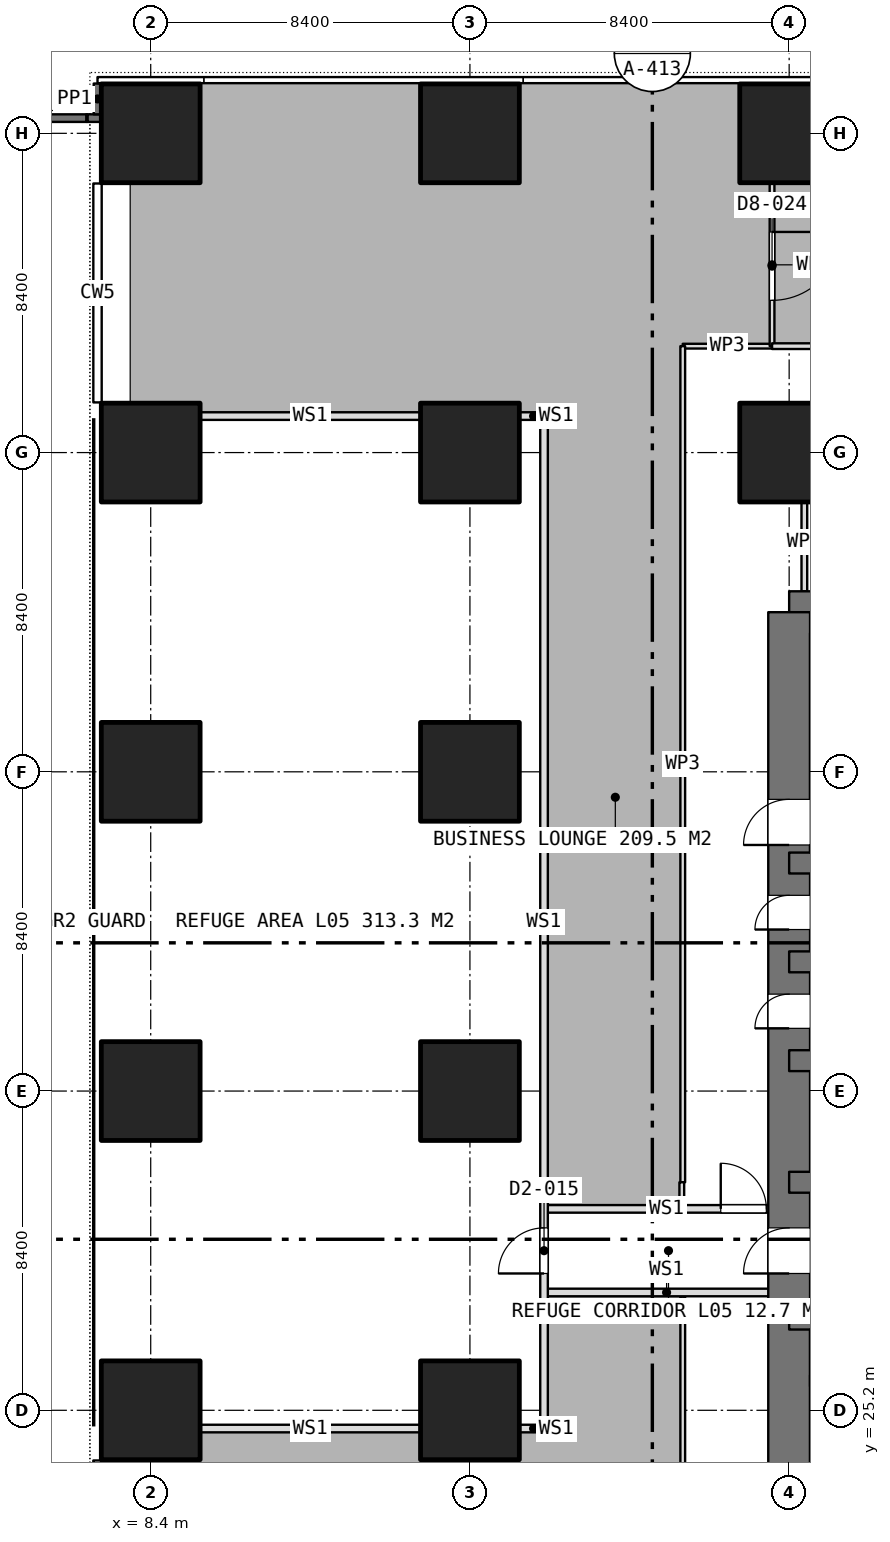
"""IFC4 building model, lengths in metres.
Left out: names, types, materials, properties, quantities, classifications, styles, units other than length and angle.
Written with IfcOpenShell. Run it as: python <this file> out.ifc"""

import sys

from ifc_helpers import new_model, si_unit, direction, frame, frame_2d, origin, origin_2d, place, context, subcontext, project, spatial, rectangle, extrude, element, fill, save


model = new_model("IFC4")
c1 = context("Model", 3, precision=1e-05, world=origin(), true_north=direction((0.0, 1.0)))
c2 = subcontext(c1, "Body", "Model", "MODEL_VIEW")
j1 = project(units=[si_unit("LENGTHUNIT", "METRE"), si_unit("PLANEANGLEUNIT", "RADIAN")], contexts=[c1])
p1 = place(None, origin())
s1 = spatial("IfcSite", under=j1, at=p1, CompositionType="ELEMENT")
p2 = place(p1, origin())
s2 = spatial("IfcBuilding", under=s1, at=p2, CompositionType="ELEMENT")
p3 = place(p2, frame((0.0, 0.0, 25.4)))
s3 = spatial("IfcBuildingStorey", under=s2, at=p3, CompositionType="ELEMENT", Elevation=25.4)
p4 = place(p3, frame((25.2, 46.2, 0.0), z_axis=(0.0, 0.0, 1.0), x_axis=(1.0, 0.0, 0.0)))
e1 = element("IfcWall", 1, at=p4, inside=s3, PredefinedType="SHEAR", context=c2, shape_type="SweptSolid", body=[
    extrude(rectangle(XDim=10.4, YDim=1.1, at=frame_2d((5.2, 0.0))), origin(), (0.0, 0.0, 1.0), 3.75),
])
p5 = place(p3, frame((25.2, 21.0, 0.0), z_axis=(0.0, 0.0, 1.0), x_axis=(0.0, 1.0, 0.0)))
e2 = element("IfcWall", 2, at=p5, inside=s3, PredefinedType="SHEAR", context=c2, shape_type="SweptSolid", body=[
    extrude(rectangle(XDim=25.2, YDim=1.1, at=frame_2d((12.6, 0.0))), origin(), (0.0, 0.0, 1.0), 3.75),
])
p6 = place(p5, frame((7.8, 0.0, 0.0)))
e3 = element("IfcOpeningElement", 3, at=p6, cuts=e2, PredefinedType="OPENING", context=c2, shape_type="SweptSolid", body=[
    extrude(rectangle(XDim=1.2, YDim=2.1, at=frame_2d((0.6, 1.05))), frame((0.0, 0.56, 0.0), z_axis=(0.0, -1.0, 0.0), x_axis=(1.0, 0.0, 0.0)), (0.0, 0.0, 1.0), 1.12),
])
p7 = place(p5, frame((14.25, 0.0, 0.0)))
e4 = element("IfcOpeningElement", 4, at=p7, cuts=e2, PredefinedType="OPENING", context=c2, shape_type="SweptSolid", body=[
    extrude(rectangle(XDim=0.9, YDim=2.1, at=frame_2d((0.45, 1.05))), frame((0.0, 0.56, 0.0), z_axis=(0.0, -1.0, 0.0), x_axis=(1.0, 0.0, 0.0)), (0.0, 0.0, 1.0), 1.12),
])
p8 = place(p5, frame((16.85, 0.0, 0.0)))
e5 = element("IfcOpeningElement", 5, at=p8, cuts=e2, PredefinedType="OPENING", context=c2, shape_type="SweptSolid", body=[
    extrude(rectangle(XDim=0.9, YDim=2.1, at=frame_2d((0.45, 1.05))), frame((0.0, 0.56, 0.0), z_axis=(0.0, -1.0, 0.0), x_axis=(1.0, 0.0, 0.0)), (0.0, 0.0, 1.0), 1.12),
])
p9 = place(p5, frame((19.075, 0.0, 0.0)))
e6 = element("IfcOpeningElement", 6, at=p9, cuts=e2, PredefinedType="OPENING", context=c2, shape_type="SweptSolid", body=[
    extrude(rectangle(XDim=1.2, YDim=2.1, at=frame_2d((0.6, 1.05))), frame((0.0, 0.56, 0.0), z_axis=(0.0, -1.0, 0.0), x_axis=(1.0, 0.0, 0.0)), (0.0, 0.0, 1.0), 1.12),
])
p10 = place(p3, frame((25.2, 27.6, 0.0), z_axis=(0.0, 0.0, 1.0), x_axis=(1.0, 0.0, 0.0)))
e7 = element("IfcWall", 7, at=p10, inside=s3, PredefinedType="SHEAR", context=c2, shape_type="SweptSolid", body=[
    extrude(rectangle(XDim=6.6, YDim=0.55, at=frame_2d((3.3, 0.0))), origin(), (0.0, 0.0, 1.0), 3.75),
])
p11 = place(p10, frame((4.925, 0.0, 0.0)))
e8 = element("IfcOpeningElement", 8, at=p11, cuts=e7, PredefinedType="OPENING", context=c2, shape_type="SweptSolid", body=[
    extrude(rectangle(XDim=1.2, YDim=2.1, at=frame_2d((0.6, 1.05))), frame((0.0, 0.285, 0.0), z_axis=(0.0, -1.0, 0.0), x_axis=(1.0, 0.0, 0.0)), (0.0, 0.0, 1.0), 0.57),
])
p12 = place(p3, frame((25.2, 31.2, 0.0), z_axis=(0.0, 0.0, 1.0), x_axis=(1.0, 0.0, 0.0)))
e9 = element("IfcWall", 9, at=p12, inside=s3, PredefinedType="SHEAR", context=c2, shape_type="SweptSolid", body=[
    extrude(rectangle(XDim=6.6, YDim=0.55, at=frame_2d((3.3, 0.0))), origin(), (0.0, 0.0, 1.0), 3.75),
])
p13 = place(p12, frame((2.65, 0.0, 0.0)))
e10 = element("IfcOpeningElement", 10, at=p13, cuts=e9, PredefinedType="OPENING", context=c2, shape_type="SweptSolid", body=[
    extrude(rectangle(XDim=1.3, YDim=2.1, at=frame_2d((0.65, 1.05))), frame((0.0, 0.285, 0.0), z_axis=(0.0, -1.0, 0.0), x_axis=(1.0, 0.0, 0.0)), (0.0, 0.0, 1.0), 0.57),
])
for number, where, z_axis, x_axis in (
    (11, (25.2, 34.4, 0.0), (0.0, 0.0, 1.0), (1.0, 0.0, 0.0)),
    (12, (25.2, 37.0, 0.0), (0.0, 0.0, 1.0), (1.0, 0.0, 0.0)),
    (13, (25.2, 39.6, 0.0), (0.0, 0.0, 1.0), (1.0, 0.0, 0.0)),
):
    element("IfcWall", number, at=place(p3, frame(where, z_axis=z_axis, x_axis=x_axis)), inside=s3, PredefinedType="SHEAR", context=c2, shape_type="SweptSolid", body=[
        extrude(rectangle(XDim=6.6, YDim=0.55, at=frame_2d((3.3, 0.0))), origin(), (0.0, 0.0, 1.0), 3.75),
    ])
for number, where, z_axis, x_axis in (
    (14, (8.4, 25.2, 0.0), (0.0, 0.0, 1.0), (1.0, 0.0, 0.0)),
    (15, (8.4, 33.6, 0.0), (0.0, 0.0, 1.0), (1.0, 0.0, 0.0)),
    (16, (8.4, 42.0, 0.0), (0.0, 0.0, 1.0), (1.0, 0.0, 0.0)),
    (17, (8.4, 50.4, 0.0), (0.0, 0.0, 1.0), (1.0, 0.0, 0.0)),
    (18, (8.4, 58.8, 0.0), (0.0, 0.0, 1.0), (1.0, 0.0, 0.0)),
    (19, (16.8, 25.2, 0.0), (0.0, 0.0, 1.0), (1.0, 0.0, 0.0)),
    (20, (16.8, 33.6, 0.0), (0.0, 0.0, 1.0), (1.0, 0.0, 0.0)),
    (21, (16.8, 42.0, 0.0), (0.0, 0.0, 1.0), (1.0, 0.0, 0.0)),
    (22, (16.8, 50.4, 0.0), (0.0, 0.0, 1.0), (1.0, 0.0, 0.0)),
    (23, (16.8, 58.8, 0.0), (0.0, 0.0, 1.0), (1.0, 0.0, 0.0)),
    (24, (25.2, 50.4, 0.0), (0.0, 0.0, 1.0), (1.0, 0.0, 0.0)),
    (25, (25.2, 58.8, 0.0), (0.0, 0.0, 1.0), (1.0, 0.0, 0.0)),
):
    element("IfcColumn", number, at=place(p3, frame(where, z_axis=z_axis, x_axis=x_axis)), inside=s3, PredefinedType="COLUMN", context=c2, shape_type="SweptSolid", body=[
        extrude(rectangle(XDim=2.6, YDim=2.6, at=origin_2d()), origin(), (0.0, 0.0, 1.0), 3.75),
    ])
p14 = place(p3, frame((6.74, 59.2, 0.0), z_axis=(0.0, 0.0, 1.0), x_axis=(-1.0, 0.0, 0.0)))
e26 = element("IfcWall", 26, at=p14, inside=s3, PredefinedType="PARAPET", context=c2, shape_type="SweptSolid", body=[
    extrude(rectangle(XDim=0.035, YDim=0.2, at=frame_2d((0.018, 0.0))), origin(), (0.0, 0.0, 1.0), 1.1),
])
p15 = place(p3, frame((6.705, 59.2, 0.0), z_axis=(0.0, 0.0, 1.0), x_axis=(-1.0, 0.0, 0.0)))
e27 = element("IfcWall", 27, at=p15, inside=s3, PredefinedType="PARAPET", context=c2, shape_type="SweptSolid", body=[
    extrude(rectangle(XDim=7.105, YDim=0.2, at=frame_2d((3.552, 0.0))), origin(), (0.0, 0.0, 1.0), 1.1),
])
p16 = place(p3, frame((6.74, 59.2, 0.0), z_axis=(0.0, 0.0, 1.0), x_axis=(1.0, 0.0, 0.0)))
e28 = element("IfcWall", 28, at=p16, inside=s3, PredefinedType="PARAPET", context=c2, shape_type="SweptSolid", body=[
    extrude(rectangle(XDim=0.36, YDim=0.2, at=frame_2d((0.18, 0.0))), origin(), (0.0, 0.0, 1.0), 1.1),
])
p17 = place(p3, frame((7.0, 59.3, 0.0), z_axis=(0.0, 0.0, 1.0), x_axis=(0.0, 1.0, 0.0)))
e29 = element("IfcWall", 29, at=p17, inside=s3, PredefinedType="PARAPET", context=c2, shape_type="SweptSolid", body=[
    extrude(rectangle(XDim=0.81, YDim=0.2, at=frame_2d((0.405, 0.0))), origin(), (0.0, 0.0, 1.0), 1.1),
])
p18 = place(p3, frame((25.525, 49.4, 0.0), z_axis=(0.0, 0.0, 1.0), x_axis=(1.0, 0.0, 0.0)))
e30 = element("IfcWall", 30, at=p18, inside=s3, PredefinedType="PARTITIONING", context=c2, shape_type="SweptSolid", body=[
    extrude(rectangle(XDim=9.75, YDim=0.15, at=frame_2d((4.875, 0.0))), origin(), (0.0, 0.0, 1.0), 3.5),
])
p19 = place(p18, frame((4.375, 0.0, 0.0)))
e31 = element("IfcOpeningElement", 31, at=p19, cuts=e30, PredefinedType="OPENING", context=c2, shape_type="SweptSolid", body=[
    extrude(rectangle(XDim=1.0, YDim=2.1, at=frame_2d((0.5, 1.05))), frame((0.0, 0.085, 0.0), z_axis=(0.0, -1.0, 0.0), x_axis=(1.0, 0.0, 0.0)), (0.0, 0.0, 1.0), 0.17),
])
p20 = place(p3, frame((25.6, 46.75, 0.0), z_axis=(0.0, 0.0, 1.0), x_axis=(0.0, 1.0, 0.0)))
e32 = element("IfcWall", 32, at=p20, inside=s3, PredefinedType="PARTITIONING", context=c2, shape_type="SweptSolid", body=[
    extrude(rectangle(XDim=2.575, YDim=0.15, at=frame_2d((1.288, 0.0))), origin(), (0.0, 0.0, 1.0), 3.5),
])
p21 = place(p3, frame((24.75, 53.2, 0.0), z_axis=(0.0, 0.0, 1.0), x_axis=(-1.0, 0.0, 0.0)))
e33 = element("IfcWall", 33, at=p21, inside=s3, PredefinedType="PARTITIONING", context=c2, shape_type="SweptSolid", body=[
    extrude(rectangle(XDim=2.35, YDim=0.125, at=frame_2d((1.175, 0.0))), origin(), (0.0, 0.0, 1.0), 3.5),
])
p22 = place(p3, frame((22.4, 53.2, 0.0), z_axis=(0.0, 0.0, 1.0), x_axis=(0.0, -1.0, 0.0)))
e34 = element("IfcWall", 34, at=p22, inside=s3, PredefinedType="PARTITIONING", context=c2, shape_type="SweptSolid", body=[
    extrude(rectangle(XDim=22.0, YDim=0.125, at=frame_2d((11.0, 0.0))), origin(), (0.0, 0.0, 1.0), 3.5),
])
p23 = place(p3, frame((22.375, 31.2, 0.0), z_axis=(0.0, 0.0, 1.0), x_axis=(0.0, -1.0, 0.0)))
e35 = element("IfcWall", 35, at=p23, inside=s3, PredefinedType="PARTITIONING", context=c2, shape_type="SweptSolid", body=[
    extrude(rectangle(XDim=0.589, YDim=0.125, at=frame_2d((0.294, 0.0))), origin(), (0.0, 0.0, 1.0), 3.5),
])
p24 = place(p3, frame((24.75, 57.48, 0.0), z_axis=(0.0, 0.0, 1.0), x_axis=(0.0, -1.0, 0.0)))
e36 = element("IfcWall", 36, at=p24, inside=s3, PredefinedType="PARTITIONING", context=c2, shape_type="SweptSolid", body=[
    extrude(rectangle(XDim=4.28, YDim=0.125, at=frame_2d((2.14, 0.0))), origin(), (0.0, 0.0, 1.0), 3.5),
])
p25 = place(p24, frame((1.275, 0.0, 0.0)))
e37 = element("IfcOpeningElement", 37, at=p25, cuts=e36, PredefinedType="OPENING", context=c2, shape_type="SweptSolid", body=[
    extrude(rectangle(XDim=1.8, YDim=2.1, at=frame_2d((0.9, 1.05))), frame((0.0, 0.073, 0.0), z_axis=(0.0, -1.0, 0.0), x_axis=(1.0, 0.0, 0.0)), (0.0, 0.0, 1.0), 0.145),
])
p26 = place(p3, frame((50.399, 53.2, 0.0), z_axis=(0.0, 0.0, 1.0), x_axis=(-1.0, 0.0, 0.0)))
e38 = element("IfcWall", 38, at=p26, inside=s3, PredefinedType="PARTITIONING", context=c2, shape_type="SweptSolid", body=[
    extrude(rectangle(XDim=25.649, YDim=0.15, at=frame_2d((12.824, 0.0))), origin(), (0.0, 0.0, 1.0), 3.5),
])
p27 = place(p26, frame((12.325, 0.0, 0.0)))
e39 = element("IfcOpeningElement", 39, at=p27, cuts=e38, PredefinedType="OPENING", context=c2, shape_type="SweptSolid", body=[
    extrude(rectangle(XDim=1.0, YDim=2.1, at=frame_2d((0.5, 1.05))), frame((0.0, 0.085, 0.0), z_axis=(0.0, -1.0, 0.0), x_axis=(1.0, 0.0, 0.0)), (0.0, 0.0, 1.0), 0.17),
])
p28 = place(p3, frame((22.4, 28.189, 0.0), z_axis=(0.0, 0.0, 1.0), x_axis=(0.0, -1.0, 0.0)))
e40 = element("IfcWall", 40, at=p28, inside=s3, PredefinedType="PARTITIONING", context=c2, shape_type="SweptSolid", body=[
    extrude(rectangle(XDim=9.57, YDim=0.125, at=frame_2d((4.785, 0.0))), origin(), (0.0, 0.0, 1.0), 3.5),
])
p29 = place(p3, frame((18.75, 24.82, 0.0), z_axis=(0.0, 0.0, 1.0), x_axis=(0.0, 1.0, 0.0)))
e41 = element("IfcWall", 41, at=p29, inside=s3, PredefinedType="PARTITIONING", context=c2, shape_type="SweptSolid", body=[
    extrude(rectangle(XDim=26.44, YDim=0.2, at=frame_2d((13.22, 0.0))), origin(), (0.0, 0.0, 1.0), 3.5),
])
p30 = place(p29, frame((3.98, 0.0, 0.0)))
e42 = element("IfcOpeningElement", 42, at=p30, cuts=e41, PredefinedType="OPENING", context=c2, shape_type="SweptSolid", body=[
    extrude(rectangle(XDim=1.2, YDim=2.1, at=frame_2d((0.6, 1.05))), frame((0.0, 0.11, 0.0), z_axis=(0.0, -1.0, 0.0), x_axis=(1.0, 0.0, 0.0)), (0.0, 0.0, 1.0), 0.22),
])
p31 = place(p3, frame((9.7, 24.72, 0.0), z_axis=(0.0, 0.0, 1.0), x_axis=(1.0, 0.0, 0.0)))
e43 = element("IfcWall", 43, at=p31, inside=s3, PredefinedType="PARTITIONING", context=c2, shape_type="SweptSolid", body=[
    extrude(rectangle(XDim=5.8, YDim=0.2, at=frame_2d((2.9, 0.0))), origin(), (0.0, 0.0, 1.0), 3.5),
])
p32 = place(p3, frame((18.1, 24.72, 0.0), z_axis=(0.0, 0.0, 1.0), x_axis=(1.0, 0.0, 0.0)))
e44 = element("IfcWall", 44, at=p32, inside=s3, PredefinedType="PARTITIONING", context=c2, shape_type="SweptSolid", body=[
    extrude(rectangle(XDim=0.75, YDim=0.2, at=frame_2d((0.375, 0.0))), origin(), (0.0, 0.0, 1.0), 3.5),
])
p33 = place(p3, frame((9.7, 51.36, 0.0), z_axis=(0.0, 0.0, 1.0), x_axis=(1.0, 0.0, 0.0)))
e45 = element("IfcWall", 45, at=p33, inside=s3, PredefinedType="PARTITIONING", context=c2, shape_type="SweptSolid", body=[
    extrude(rectangle(XDim=5.8, YDim=0.2, at=frame_2d((2.9, 0.0))), origin(), (0.0, 0.0, 1.0), 3.5),
])
p34 = place(p3, frame((18.1, 51.36, 0.0), z_axis=(0.0, 0.0, 1.0), x_axis=(1.0, 0.0, 0.0)))
e46 = element("IfcWall", 46, at=p34, inside=s3, PredefinedType="PARTITIONING", context=c2, shape_type="SweptSolid", body=[
    extrude(rectangle(XDim=0.75, YDim=0.2, at=frame_2d((0.375, 0.0))), origin(), (0.0, 0.0, 1.0), 3.5),
])
p35 = place(p3, frame((18.75, 30.5, 0.0), z_axis=(0.0, 0.0, 1.0), x_axis=(1.0, 0.0, 0.0)))
e47 = element("IfcWall", 47, at=p35, inside=s3, PredefinedType="PARTITIONING", context=c2, shape_type="SweptSolid", body=[
    extrude(rectangle(XDim=6.45, YDim=0.2, at=frame_2d((3.225, 0.0))), origin(), (0.0, 0.0, 1.0), 3.5),
])
p36 = place(p35, frame((4.65, 0.0, 0.0)))
e48 = element("IfcOpeningElement", 48, at=p36, cuts=e47, PredefinedType="OPENING", context=c2, shape_type="SweptSolid", body=[
    extrude(rectangle(XDim=1.2, YDim=2.1, at=frame_2d((0.6, 1.05))), frame((0.0, 0.11, 0.0), z_axis=(0.0, -1.0, 0.0), x_axis=(1.0, 0.0, 0.0)), (0.0, 0.0, 1.0), 0.22),
])
p37 = place(p3, frame((18.75, 28.3, 0.0), z_axis=(0.0, 0.0, 1.0), x_axis=(1.0, 0.0, 0.0)))
e49 = element("IfcWall", 49, at=p37, inside=s3, PredefinedType="PARTITIONING", context=c2, shape_type="SweptSolid", body=[
    extrude(rectangle(XDim=6.45, YDim=0.2, at=frame_2d((3.225, 0.0))), origin(), (0.0, 0.0, 1.0), 3.5),
])
p38 = place(p6, origin())
e50 = element("IfcDoor", 50, at=p38, inside=s3, OperationType="SINGLE_SWING_LEFT", PredefinedType="DOOR", context=c2, shape_type="SweptSolid", body=[
    extrude(rectangle(XDim=1.2, YDim=2.1, at=frame_2d((0.6, 1.05))), frame((0.0, 0.025, 0.0), z_axis=(0.0, -1.0, 0.0), x_axis=(1.0, 0.0, 0.0)), (0.0, 0.0, 1.0), 0.05),
])
fill(e3, e50)
p39 = place(p7, origin())
e51 = element("IfcDoor", 51, at=p39, inside=s3, OperationType="SINGLE_SWING_LEFT", PredefinedType="DOOR", context=c2, shape_type="SweptSolid", body=[
    extrude(rectangle(XDim=0.9, YDim=2.1, at=frame_2d((0.45, 1.05))), frame((0.0, 0.025, 0.0), z_axis=(0.0, -1.0, 0.0), x_axis=(1.0, 0.0, 0.0)), (0.0, 0.0, 1.0), 0.05),
])
fill(e4, e51)
p40 = place(p8, origin())
e52 = element("IfcDoor", 52, at=p40, inside=s3, OperationType="SINGLE_SWING_LEFT", PredefinedType="DOOR", context=c2, shape_type="SweptSolid", body=[
    extrude(rectangle(XDim=0.9, YDim=2.1, at=frame_2d((0.45, 1.05))), frame((0.0, 0.025, 0.0), z_axis=(0.0, -1.0, 0.0), x_axis=(1.0, 0.0, 0.0)), (0.0, 0.0, 1.0), 0.05),
])
fill(e5, e52)
p41 = place(p25, origin())
e53 = element("IfcDoor", 53, at=p41, inside=s3, OperationType="DOUBLE_DOOR_SINGLE_SWING", PredefinedType="DOOR", context=c2, shape_type="SweptSolid", body=[
    extrude(rectangle(XDim=1.8, YDim=2.1, at=frame_2d((0.9, 1.05))), frame((0.0, 0.025, 0.0), z_axis=(0.0, -1.0, 0.0), x_axis=(1.0, 0.0, 0.0)), (0.0, 0.0, 1.0), 0.05),
])
fill(e37, e53)
p42 = place(p9, origin())
e54 = element("IfcDoor", 54, at=p42, inside=s3, OperationType="SINGLE_SWING_RIGHT", PredefinedType="DOOR", context=c2, shape_type="SweptSolid", body=[
    extrude(rectangle(XDim=1.2, YDim=2.1, at=frame_2d((0.6, 1.05))), frame((0.0, 0.025, 0.0), z_axis=(0.0, -1.0, 0.0), x_axis=(1.0, 0.0, 0.0)), (0.0, 0.0, 1.0), 0.05),
])
fill(e6, e54)
p43 = place(p30, origin())
e55 = element("IfcDoor", 55, at=p43, inside=s3, OperationType="SINGLE_SWING_LEFT", PredefinedType="DOOR", context=c2, shape_type="SweptSolid", body=[
    extrude(rectangle(XDim=1.2, YDim=2.1, at=frame_2d((0.6, 1.05))), frame((0.0, 0.025, 0.0), z_axis=(0.0, -1.0, 0.0), x_axis=(1.0, 0.0, 0.0)), (0.0, 0.0, 1.0), 0.05),
])
fill(e42, e55)
p44 = place(p36, origin())
e56 = element("IfcDoor", 56, at=p44, inside=s3, OperationType="SINGLE_SWING_LEFT", PredefinedType="DOOR", context=c2, shape_type="SweptSolid", body=[
    extrude(rectangle(XDim=1.2, YDim=2.1, at=frame_2d((0.6, 1.05))), frame((0.0, 0.025, 0.0), z_axis=(0.0, -1.0, 0.0), x_axis=(1.0, 0.0, 0.0)), (0.0, 0.0, 1.0), 0.05),
])
fill(e48, e56)
save(model, sys.argv[1])
